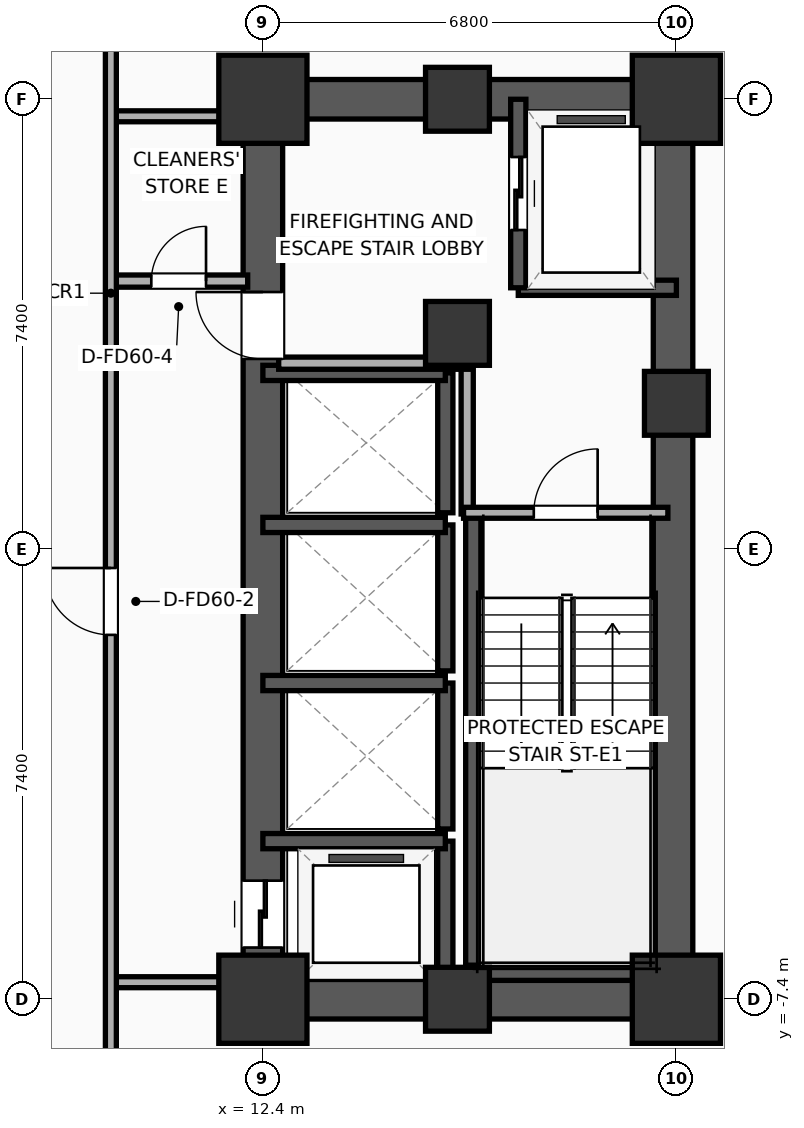
"""IFC4 building model, lengths in metres.
Left out: names, types, materials, properties, quantities, classifications, styles, units other than length and angle.
Written with IfcOpenShell. Run it as: python <this file> out.ifc"""

import sys

from ifc_helpers import new_model, si_unit, direction, frame, frame_2d, origin, origin_2d, place, context, subcontext, project, spatial, rectangle, extrude, element, fill, save


model = new_model("IFC4")
c1 = context("Model", 3, precision=1e-05, world=origin(), true_north=direction((0.0, 1.0)))
c2 = subcontext(c1, "Body", "Model", "MODEL_VIEW")
j1 = project(units=[si_unit("LENGTHUNIT", "METRE"), si_unit("PLANEANGLEUNIT", "RADIAN")], contexts=[c1])
p1 = place(None, origin())
s1 = spatial("IfcSite", under=j1, at=p1, CompositionType="ELEMENT")
p2 = place(p1, origin())
s2 = spatial("IfcBuilding", under=s1, at=p2, CompositionType="ELEMENT")
p3 = place(p2, frame((0.0, 0.0, 41.6)))
s3 = spatial("IfcBuildingStorey", under=s2, at=p3, CompositionType="ELEMENT", Elevation=41.6)
p4 = place(p3, frame((12.4, -7.4, 0.0), z_axis=(0.0, 0.0, 1.0), x_axis=(1.0, 0.0, 0.0)))
e1 = element("IfcColumn", 1, at=p4, inside=s3, PredefinedType="COLUMN", context=c2, shape_type="SweptSolid", body=[
    extrude(rectangle(XDim=1.45, YDim=1.45, at=origin_2d()), origin(), (0.0, 0.0, 1.0), 3.9),
])
p5 = place(p3, frame((15.6, 3.55, 0.0), z_axis=(0.0, 0.0, 1.0), x_axis=(1.0, 0.0, 0.0)))
e2 = element("IfcColumn", 2, at=p5, inside=s3, PredefinedType="COLUMN", context=c2, shape_type="SweptSolid", body=[
    extrude(rectangle(XDim=1.05, YDim=1.05, at=origin_2d()), origin(), (0.0, 0.0, 1.0), 3.9),
])
p6 = place(p3, frame((12.4, 7.4, 0.0), z_axis=(0.0, 0.0, 1.0), x_axis=(1.0, 0.0, 0.0)))
e3 = element("IfcColumn", 3, at=p6, inside=s3, PredefinedType="COLUMN", context=c2, shape_type="SweptSolid", body=[
    extrude(rectangle(XDim=1.45, YDim=1.45, at=origin_2d()), origin(), (0.0, 0.0, 1.0), 3.9),
])
for number, where, z_axis, x_axis in (
    (4, (15.6, -7.4, 0.0), (0.0, 0.0, 1.0), (1.0, 0.0, 0.0)),
    (5, (15.6, 7.4, 0.0), (0.0, 0.0, 1.0), (1.0, 0.0, 0.0)),
):
    element("IfcColumn", number, at=place(p3, frame(where, z_axis=z_axis, x_axis=x_axis)), inside=s3, PredefinedType="COLUMN", context=c2, shape_type="SweptSolid", body=[
        extrude(rectangle(XDim=1.05, YDim=1.05, at=origin_2d()), origin(), (0.0, 0.0, 1.0), 3.9),
    ])
p7 = place(p3, frame((19.2, -7.4, 0.0), z_axis=(0.0, 0.0, 1.0), x_axis=(1.0, 0.0, 0.0)))
e6 = element("IfcColumn", 6, at=p7, inside=s3, PredefinedType="COLUMN", context=c2, shape_type="SweptSolid", body=[
    extrude(rectangle(XDim=1.45, YDim=1.45, at=origin_2d()), origin(), (0.0, 0.0, 1.0), 3.9),
])
p8 = place(p3, frame((19.2, 2.4, 0.0), z_axis=(0.0, 0.0, 1.0), x_axis=(1.0, 0.0, 0.0)))
e7 = element("IfcColumn", 7, at=p8, inside=s3, PredefinedType="COLUMN", context=c2, shape_type="SweptSolid", body=[
    extrude(rectangle(XDim=1.05, YDim=1.05, at=origin_2d()), origin(), (0.0, 0.0, 1.0), 3.9),
])
p9 = place(p3, frame((19.2, 7.4, 0.0), z_axis=(0.0, 0.0, 1.0), x_axis=(1.0, 0.0, 0.0)))
e8 = element("IfcColumn", 8, at=p9, inside=s3, PredefinedType="COLUMN", context=c2, shape_type="SweptSolid", body=[
    extrude(rectangle(XDim=1.45, YDim=1.45, at=origin_2d()), origin(), (0.0, 0.0, 1.0), 3.9),
])
for number, where, z_axis, x_axis in (
    (9, (12.075, -7.4, 0.0), (0.0, 0.0, 1.0), (1.0, 0.0, 0.0)),
    (10, (12.075, 7.4, 0.0), (0.0, 0.0, 1.0), (1.0, 0.0, 0.0)),
):
    element("IfcWall", number, at=place(p3, frame(where, z_axis=z_axis, x_axis=x_axis)), inside=s3, PredefinedType="SHEAR", context=c2, shape_type="SweptSolid", body=[
        extrude(rectangle(XDim=7.45, YDim=0.65, at=frame_2d((3.725, 0.0))), origin(), (0.0, 0.0, 1.0), 3.65),
    ])
p10 = place(p3, frame((12.4, -7.4, 0.0), z_axis=(0.0, 0.0, 1.0), x_axis=(0.0, 1.0, 0.0)))
e11 = element("IfcWall", 11, at=p10, inside=s3, PredefinedType="SHEAR", context=c2, shape_type="SweptSolid", body=[
    extrude(rectangle(XDim=14.8, YDim=0.65, at=frame_2d((7.4, 0.0))), origin(), (0.0, 0.0, 1.0), 3.65),
])
p11 = place(p10, frame((0.85, 0.0, 0.0)))
e12 = element("IfcOpeningElement", 12, at=p11, cuts=e11, PredefinedType="OPENING", context=c2, shape_type="SweptSolid", body=[
    extrude(rectangle(XDim=1.1, YDim=2.05, at=frame_2d((0.55, 1.025))), frame((0.0, 0.335, 0.0), z_axis=(0.0, -1.0, 0.0), x_axis=(1.0, 0.0, 0.0)), (0.0, 0.0, 1.0), 0.67),
])
p12 = place(p10, frame((10.53, 0.0, 0.0)))
e13 = element("IfcOpeningElement", 13, at=p12, cuts=e11, PredefinedType="OPENING", context=c2, shape_type="SweptSolid", body=[
    extrude(rectangle(XDim=1.1, YDim=2.05, at=frame_2d((0.55, 1.025))), frame((0.0, 0.335, 0.0), z_axis=(0.0, -1.0, 0.0), x_axis=(1.0, 0.0, 0.0)), (0.0, 0.0, 1.0), 0.67),
])
p13 = place(p3, frame((19.145, -7.4, 0.0), z_axis=(0.0, 0.0, 1.0), x_axis=(0.0, 1.0, 0.0)))
e14 = element("IfcWall", 14, at=p13, inside=s3, PredefinedType="SHEAR", context=c2, shape_type="SweptSolid", body=[
    extrude(rectangle(XDim=14.8, YDim=0.65, at=frame_2d((7.4, 0.0))), origin(), (0.0, 0.0, 1.0), 3.65),
])
p14 = place(p3, frame((15.86, -7.085, 0.0), z_axis=(0.0, 0.0, 1.0), x_axis=(0.0, 1.0, 0.0)))
e15 = element("IfcWall", 15, at=p14, inside=s3, PredefinedType="SOLIDWALL", context=c2, shape_type="SweptSolid", body=[
    extrude(rectangle(XDim=7.685, YDim=0.25, at=frame_2d((3.843, 0.0))), origin(), (0.0, 0.0, 1.0), 3.65),
])
p15 = place(p3, frame((15.74, -6.965, 0.0), z_axis=(0.0, 0.0, 1.0), x_axis=(1.0, 0.0, 0.0)))
e16 = element("IfcWall", 16, at=p15, inside=s3, PredefinedType="SOLIDWALL", context=c2, shape_type="SweptSolid", body=[
    extrude(rectangle(XDim=3.46, YDim=0.25, at=frame_2d((1.73, 0.0))), origin(), (0.0, 0.0, 1.0), 3.65),
])
p16 = place(p3, frame((16.6, 4.3, 0.0), z_axis=(0.0, 0.0, 1.0), x_axis=(1.0, 0.0, 0.0)))
e17 = element("IfcWall", 17, at=p16, inside=s3, PredefinedType="SOLIDWALL", context=c2, shape_type="SweptSolid", body=[
    extrude(rectangle(XDim=2.6, YDim=0.25, at=frame_2d((1.3, 0.0))), origin(), (0.0, 0.0, 1.0), 3.65),
])
p17 = place(p3, frame((16.6, 7.4, 0.0), z_axis=(0.0, 0.0, 1.0), x_axis=(0.0, -1.0, 0.0)))
e18 = element("IfcWall", 18, at=p17, inside=s3, PredefinedType="SOLIDWALL", context=c2, shape_type="SweptSolid", body=[
    extrude(rectangle(XDim=3.1, YDim=0.25, at=frame_2d((1.55, 0.0))), origin(), (0.0, 0.0, 1.0), 3.65),
])
p18 = place(p17, frame((0.95, 0.0, 0.0)))
e19 = element("IfcOpeningElement", 19, at=p18, cuts=e18, PredefinedType="OPENING", context=c2, shape_type="SweptSolid", body=[
    extrude(rectangle(XDim=1.2, YDim=2.05, at=frame_2d((0.6, 1.025))), frame((0.0, 0.135, 0.0), z_axis=(0.0, -1.0, 0.0), x_axis=(1.0, 0.0, 0.0)), (0.0, 0.0, 1.0), 0.27),
])
p19 = place(p3, frame((15.4, -7.4, 0.0), z_axis=(0.0, 0.0, 1.0), x_axis=(0.0, 1.0, 0.0)))
e20 = element("IfcWall", 20, at=p19, inside=s3, PredefinedType="SOLIDWALL", context=c2, shape_type="SweptSolid", body=[
    extrude(rectangle(XDim=2.6, YDim=0.25, at=frame_2d((1.3, 0.0))), origin(), (0.0, 0.0, 1.0), 3.65),
])
p20 = place(p3, frame((15.4, -4.8, 0.0), z_axis=(0.0, 0.0, 1.0), x_axis=(-1.0, 0.0, 0.0)))
e21 = element("IfcWall", 21, at=p20, inside=s3, PredefinedType="SOLIDWALL", context=c2, shape_type="SweptSolid", body=[
    extrude(rectangle(XDim=3.0, YDim=0.25, at=frame_2d((1.5, 0.0))), origin(), (0.0, 0.0, 1.0), 3.65),
])
p21 = place(p3, frame((15.4, -4.6, 0.0), z_axis=(0.0, 0.0, 1.0), x_axis=(0.0, 1.0, 0.0)))
e22 = element("IfcWall", 22, at=p21, inside=s3, PredefinedType="SOLIDWALL", context=c2, shape_type="SweptSolid", body=[
    extrude(rectangle(XDim=2.4, YDim=0.25, at=frame_2d((1.2, 0.0))), origin(), (0.0, 0.0, 1.0), 3.65),
])
p22 = place(p3, frame((15.4, -2.2, 0.0), z_axis=(0.0, 0.0, 1.0), x_axis=(-1.0, 0.0, 0.0)))
e23 = element("IfcWall", 23, at=p22, inside=s3, PredefinedType="SOLIDWALL", context=c2, shape_type="SweptSolid", body=[
    extrude(rectangle(XDim=3.0, YDim=0.25, at=frame_2d((1.5, 0.0))), origin(), (0.0, 0.0, 1.0), 3.65),
])
p23 = place(p3, frame((15.4, -2.0, 0.0), z_axis=(0.0, 0.0, 1.0), x_axis=(0.0, 1.0, 0.0)))
e24 = element("IfcWall", 24, at=p23, inside=s3, PredefinedType="SOLIDWALL", context=c2, shape_type="SweptSolid", body=[
    extrude(rectangle(XDim=2.4, YDim=0.25, at=frame_2d((1.2, 0.0))), origin(), (0.0, 0.0, 1.0), 3.65),
])
p24 = place(p3, frame((15.4, 0.4, 0.0), z_axis=(0.0, 0.0, 1.0), x_axis=(-1.0, 0.0, 0.0)))
e25 = element("IfcWall", 25, at=p24, inside=s3, PredefinedType="SOLIDWALL", context=c2, shape_type="SweptSolid", body=[
    extrude(rectangle(XDim=3.0, YDim=0.25, at=frame_2d((1.5, 0.0))), origin(), (0.0, 0.0, 1.0), 3.65),
])
p25 = place(p3, frame((15.4, 0.6, 0.0), z_axis=(0.0, 0.0, 1.0), x_axis=(0.0, 1.0, 0.0)))
e26 = element("IfcWall", 26, at=p25, inside=s3, PredefinedType="SOLIDWALL", context=c2, shape_type="SweptSolid", body=[
    extrude(rectangle(XDim=2.3, YDim=0.25, at=frame_2d((1.15, 0.0))), origin(), (0.0, 0.0, 1.0), 3.65),
])
p26 = place(p3, frame((15.4, 2.9, 0.0), z_axis=(0.0, 0.0, 1.0), x_axis=(-1.0, 0.0, 0.0)))
e27 = element("IfcWall", 27, at=p26, inside=s3, PredefinedType="SOLIDWALL", context=c2, shape_type="SweptSolid", body=[
    extrude(rectangle(XDim=3.0, YDim=0.25, at=frame_2d((1.5, 0.0))), origin(), (0.0, 0.0, 1.0), 3.65),
])
p27 = place(p3, frame((15.76, 0.58, 0.0), z_axis=(0.0, 0.0, 1.0), x_axis=(0.0, 1.0, 0.0)))
e28 = element("IfcWall", 28, at=p27, inside=s3, PredefinedType="PARTITIONING", context=c2, shape_type="SweptSolid", body=[
    extrude(rectangle(XDim=2.52, YDim=0.2, at=frame_2d((1.26, 0.0))), origin(), (0.0, 0.0, 1.0), 3.65),
])
p28 = place(p3, frame((12.66, 3.06, 0.0), z_axis=(0.0, 0.0, 1.0), x_axis=(1.0, 0.0, 0.0)))
e29 = element("IfcWall", 29, at=p28, inside=s3, PredefinedType="PARTITIONING", context=c2, shape_type="SweptSolid", body=[
    extrude(rectangle(XDim=3.16, YDim=0.2, at=frame_2d((1.58, 0.0))), origin(), (0.0, 0.0, 1.0), 3.65),
])
p29 = place(p3, frame((15.7, 0.6, 0.0), z_axis=(0.0, 0.0, 1.0), x_axis=(1.0, 0.0, 0.0)))
e30 = element("IfcWall", 30, at=p29, inside=s3, PredefinedType="PARTITIONING", context=c2, shape_type="SweptSolid", body=[
    extrude(rectangle(XDim=3.36, YDim=0.18, at=frame_2d((1.68, 0.0))), origin(), (0.0, 0.0, 1.0), 3.65),
])
p30 = place(p29, frame((1.155, 0.0, 0.0)))
e31 = element("IfcOpeningElement", 31, at=p30, cuts=e30, PredefinedType="OPENING", context=c2, shape_type="SweptSolid", body=[
    extrude(rectangle(XDim=1.05, YDim=2.05, at=frame_2d((0.525, 1.025))), frame((0.0, 0.1, 0.0), z_axis=(0.0, -1.0, 0.0), x_axis=(1.0, 0.0, 0.0)), (0.0, 0.0, 1.0), 0.2),
])
p31 = place(p3, frame((9.88, 4.41, 0.0), z_axis=(0.0, 0.0, 1.0), x_axis=(1.0, 0.0, 0.0)))
e32 = element("IfcWall", 32, at=p31, inside=s3, PredefinedType="PARTITIONING", context=c2, shape_type="SweptSolid", body=[
    extrude(rectangle(XDim=2.27, YDim=0.2, at=frame_2d((1.135, 0.0))), origin(), (0.0, 0.0, 1.0), 3.65),
])
p32 = place(p31, frame((0.685, 0.0, 0.0)))
e33 = element("IfcOpeningElement", 33, at=p32, cuts=e32, PredefinedType="OPENING", context=c2, shape_type="SweptSolid", body=[
    extrude(rectangle(XDim=0.9, YDim=2.05, at=frame_2d((0.45, 1.025))), frame((0.0, 0.11, 0.0), z_axis=(0.0, -1.0, 0.0), x_axis=(1.0, 0.0, 0.0)), (0.0, 0.0, 1.0), 0.22),
])
for number, where, z_axis, x_axis in (
    (34, (9.88, 7.12, 0.0), (0.0, 0.0, 1.0), (1.0, 0.0, 0.0)),
    (35, (9.88, -7.12, 0.0), (0.0, 0.0, 1.0), (1.0, 0.0, 0.0)),
):
    element("IfcWall", number, at=place(p3, frame(where, z_axis=z_axis, x_axis=x_axis)), inside=s3, PredefinedType="PARTITIONING", context=c2, shape_type="SweptSolid", body=[
        extrude(rectangle(XDim=2.27, YDim=0.18, at=frame_2d((1.135, 0.0))), origin(), (0.0, 0.0, 1.0), 2.94),
    ])
p33 = place(p3, frame((9.9, -8.58, 0.0), z_axis=(0.0, 0.0, 1.0), x_axis=(0.0, 1.0, 0.0)))
e36 = element("IfcWall", 36, at=p33, inside=s3, PredefinedType="PARTITIONING", context=c2, shape_type="SweptSolid", body=[
    extrude(rectangle(XDim=17.16, YDim=0.18, at=frame_2d((8.58, 0.0))), origin(), (0.0, 0.0, 1.0), 3.65),
])
p34 = place(p33, frame((7.172, 0.0, 0.0)))
e37 = element("IfcOpeningElement", 37, at=p34, cuts=e36, PredefinedType="OPENING", context=c2, shape_type="SweptSolid", body=[
    extrude(rectangle(XDim=1.1, YDim=2.05, at=frame_2d((0.55, 1.025))), frame((0.0, 0.1, 0.0), z_axis=(0.0, -1.0, 0.0), x_axis=(1.0, 0.0, 0.0)), (0.0, 0.0, 1.0), 0.2),
])
p35 = place(p18, origin())
e38 = element("IfcDoor", 38, at=p35, inside=s3, OperationType="SLIDING_TO_LEFT", PredefinedType="DOOR", context=c2, shape_type="SweptSolid", body=[
    extrude(rectangle(XDim=1.2, YDim=2.05, at=frame_2d((0.6, 1.025))), frame((0.0, 0.025, 0.0), z_axis=(0.0, -1.0, 0.0), x_axis=(1.0, 0.0, 0.0)), (0.0, 0.0, 1.0), 0.05),
])
fill(e19, e38)
p36 = place(p11, origin())
e39 = element("IfcDoor", 39, at=p36, inside=s3, OperationType="SLIDING_TO_LEFT", PredefinedType="DOOR", context=c2, shape_type="SweptSolid", body=[
    extrude(rectangle(XDim=1.1, YDim=2.05, at=frame_2d((0.55, 1.025))), frame((0.0, 0.025, 0.0), z_axis=(0.0, -1.0, 0.0), x_axis=(1.0, 0.0, 0.0)), (0.0, 0.0, 1.0), 0.05),
])
fill(e12, e39)
p37 = place(p30, origin())
e40 = element("IfcDoor", 40, at=p37, inside=s3, OperationType="SINGLE_SWING_RIGHT", PredefinedType="DOOR", context=c2, shape_type="SweptSolid", body=[
    extrude(rectangle(XDim=1.05, YDim=2.05, at=frame_2d((0.525, 1.025))), frame((0.0, 0.025, 0.0), z_axis=(0.0, -1.0, 0.0), x_axis=(1.0, 0.0, 0.0)), (0.0, 0.0, 1.0), 0.05),
])
fill(e31, e40)
p38 = place(p32, origin())
e41 = element("IfcDoor", 41, at=p38, inside=s3, OperationType="SINGLE_SWING_RIGHT", PredefinedType="DOOR", context=c2, shape_type="SweptSolid", body=[
    extrude(rectangle(XDim=0.9, YDim=2.05, at=frame_2d((0.45, 1.025))), frame((0.0, 0.025, 0.0), z_axis=(0.0, -1.0, 0.0), x_axis=(1.0, 0.0, 0.0)), (0.0, 0.0, 1.0), 0.05),
])
fill(e33, e41)
p39 = place(p34, origin())
e42 = element("IfcDoor", 42, at=p39, inside=s3, OperationType="SINGLE_SWING_RIGHT", PredefinedType="DOOR", context=c2, shape_type="SweptSolid", body=[
    extrude(rectangle(XDim=1.1, YDim=2.05, at=frame_2d((0.55, 1.025))), frame((0.0, 0.025, 0.0), z_axis=(0.0, -1.0, 0.0), x_axis=(1.0, 0.0, 0.0)), (0.0, 0.0, 1.0), 0.05),
])
fill(e37, e42)
p40 = place(p12, origin())
e43 = element("IfcDoor", 43, at=p40, inside=s3, OperationType="SINGLE_SWING_RIGHT", PredefinedType="DOOR", context=c2, shape_type="SweptSolid", body=[
    extrude(rectangle(XDim=1.1, YDim=2.05, at=frame_2d((0.55, 1.025))), frame((0.0, 0.025, 0.0), z_axis=(0.0, -1.0, 0.0), x_axis=(1.0, 0.0, 0.0)), (0.0, 0.0, 1.0), 0.05),
])
fill(e13, e43)
save(model, sys.argv[1])
